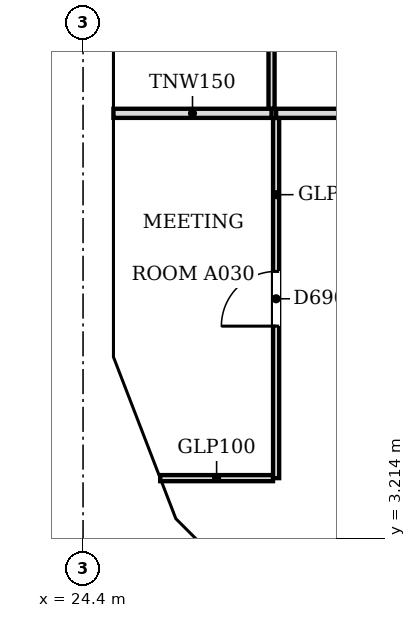
"""IFC4 building model, lengths in metres.
Left out: names, types, materials, properties, quantities, classifications, styles, units other than length and angle.
Written with IfcOpenShell. Run it as: python <this file> out.ifc"""

import sys

from ifc_helpers import new_model, si_unit, direction, frame, frame_2d, origin, place, context, subcontext, project, spatial, polyline, rectangle, outline, extrude, faceted_brep, source, transform, mapped, element, fill, save


model = new_model("IFC4")
c1 = context("Model", 3, precision=1e-05, world=origin(), true_north=direction((0.0, 1.0)))
c2 = subcontext(c1, "Body", "Model", "MODEL_VIEW")
j1 = project(units=[si_unit("LENGTHUNIT", "METRE"), si_unit("PLANEANGLEUNIT", "RADIAN")], contexts=[c1])
p1 = place(None, origin())
s1 = spatial("IfcSite", under=j1, at=p1, CompositionType="ELEMENT")
p2 = place(p1, origin())
s2 = spatial("IfcBuilding", under=s1, at=p2, CompositionType="ELEMENT")
p3 = place(p2, frame((0.0, 0.0, 102.8)))
s3 = spatial("IfcBuildingStorey", under=s2, at=p3, CompositionType="ELEMENT", Elevation=102.8)
m1 = source(origin(), c2, "Body", "Brep", [
    faceted_brep([(0.093, -0.25, 0.057), (3.143, -0.25, 3.8), (0.093, -0.25, 7.543), (0.0, 0.25, 7.544), (0.047, 0.25, 7.6), (3.143, 0.25, 3.8), (0.047, 0.25, 0.0), (0.0, 0.25, 0.056), (0.047, 0.0, 0.0), (0.047, 0.0, 7.6)], [[[0, 1, 2]], [[3, 4, 5, 6, 7]], [[6, 5, 1, 0, 8]], [[5, 4, 9, 2, 1]], [[4, 3, 9]], [[7, 6, 8]], [[7, 8, 0, 2, 9, 3]]]),
])
p4 = place(p3, frame((24.65, 12.293, -3.8), z_axis=(0.0, 0.0, 1.0), x_axis=(0.0, -1.0, 0.0)))
e1 = element("IfcWall", 1, at=p4, inside=s3, PredefinedType="SOLIDWALL", context=c2, shape_type="MappedRepresentation", body=[
    mapped(m1, transform((0.0, 0.0, 0.0), scale=1.0)),
])
m2 = source(origin(), c2, "Body", "SweptSolid", [
    extrude(outline(polyline([(0.247, 0.641), (2.821, 3.8), (0.247, 6.959), (0.247, 0.641)])), frame((0.0, 0.26, 0.0), z_axis=(0.0, -1.0, 0.0), x_axis=(1.0, 0.0, 0.0)), (0.0, 0.0, 1.0), 0.52),
])
p5 = place(p4, origin())
e2 = element("IfcOpeningElement", 2, at=p5, cuts=e1, PredefinedType="OPENING", context=c2, shape_type="MappedRepresentation", body=[
    mapped(m2, transform((0.0, 0.0, 0.0), scale=1.0)),
])
m3 = source(origin(), c2, "Body", "Brep", [
    faceted_brep([(3.003, -0.25, 0.0), (3.05, -0.25, 0.06), (3.05, -0.25, 7.54), (3.003, -0.25, 7.6), (0.0, -0.25, 3.8), (0.0, 0.25, 3.8), (2.957, 0.25, 7.541), (2.957, 0.25, 0.059), (3.003, 0.0, 0.0), (3.003, 0.0, 7.6)], [[[0, 1, 2, 3, 4]], [[5, 6, 7]], [[1, 0, 8]], [[9, 3, 2]], [[6, 5, 4, 3, 9]], [[5, 7, 8, 0, 4]], [[1, 8, 7, 6, 9, 2]]]),
])
p6 = place(p3, frame((24.65, 9.15, -3.8), z_axis=(0.0, 0.0, 1.0), x_axis=(0.0, -1.0, 0.0)))
e3 = element("IfcWall", 3, at=p6, inside=s3, PredefinedType="SOLIDWALL", context=c2, shape_type="MappedRepresentation", body=[
    mapped(m3, transform((0.0, 0.0, 0.0), scale=1.0)),
])
m4 = source(origin(), c2, "Body", "SweptSolid", [
    extrude(outline(polyline([(2.803, 6.944), (0.319, 3.8), (2.803, 0.656), (2.803, 6.944)])), frame((0.0, 0.26, 0.0), z_axis=(0.0, -1.0, 0.0), x_axis=(1.0, 0.0, 0.0)), (0.0, 0.0, 1.0), 0.52),
])
p7 = place(p6, origin())
e4 = element("IfcOpeningElement", 4, at=p7, cuts=e3, PredefinedType="OPENING", context=c2, shape_type="MappedRepresentation", body=[
    mapped(m4, transform((0.0, 0.0, 0.0), scale=1.0)),
])
m5 = source(origin(), c2, "Body", "Brep", [
    faceted_brep([(0.047, -0.25, 0.0), (2.997, -0.25, 3.8), (0.047, -0.25, 7.6), (0.0, -0.25, 7.541), (0.0, -0.25, 0.059), (0.093, 0.25, 7.54), (2.944, 0.25, 3.868), (2.944, 0.25, 3.732), (0.093, 0.25, 0.06), (2.997, 0.0, 3.8), (0.047, 0.0, 0.0), (0.047, 0.0, 7.6)], [[[0, 1, 2, 3, 4]], [[5, 6, 7, 8]], [[8, 7, 9, 1, 0, 10]], [[6, 5, 11, 2, 1, 9]], [[3, 2, 11]], [[10, 0, 4]], [[8, 10, 4, 3, 11, 5]], [[9, 7, 6]]]),
])
p8 = place(p3, frame((24.633, 6.19, -3.8), z_axis=(0.0, 0.0, 1.0), x_axis=(0.359901446078, -0.932990326376, 0.0)))
e5 = element("IfcWall", 5, at=p8, inside=s3, PredefinedType="SOLIDWALL", context=c2, shape_type="MappedRepresentation", body=[
    mapped(m5, transform((0.0, 0.0, 0.0), scale=1.0)),
])
m6 = source(origin(), c2, "Body", "SweptSolid", [
    extrude(outline(polyline([(0.247, 0.665), (2.681, 3.8), (0.247, 6.935), (0.247, 0.665)])), frame((0.0, 0.26, 0.0), z_axis=(0.0, -1.0, 0.0), x_axis=(1.0, 0.0, 0.0)), (0.0, 0.0, 1.0), 0.52),
])
p9 = place(p8, origin())
e6 = element("IfcOpeningElement", 6, at=p9, cuts=e5, PredefinedType="OPENING", context=c2, shape_type="MappedRepresentation", body=[
    mapped(m6, transform((0.0, 0.0, 0.0), scale=1.0)),
])
m7 = source(origin(), c2, "Body", "Brep", [
    faceted_brep([(2.944, -0.25, 0.0), (2.997, -0.25, 0.068), (2.997, -0.25, 7.532), (2.944, -0.25, 7.6), (0.0, -0.25, 3.8), (0.053, 0.25, 3.868), (2.891, 0.25, 7.532), (2.891, 0.25, 0.068), (0.053, 0.25, 3.732), (2.944, 0.0, 0.0), (2.944, 0.0, 7.6), (0.0, 0.0, 3.8)], [[[0, 1, 2, 3, 4]], [[5, 6, 7, 8]], [[1, 0, 9]], [[10, 3, 2]], [[6, 5, 11, 4, 3, 10]], [[8, 7, 9, 0, 4, 11]], [[8, 11, 5]], [[1, 9, 7, 6, 10, 2]]]),
])
p10 = place(p3, frame((25.712, 3.394, -3.8), z_axis=(0.0, 0.0, 1.0), x_axis=(0.707066050402, -0.707147509625, 0.0)))
e7 = element("IfcWall", 7, at=p10, inside=s3, PredefinedType="SOLIDWALL", context=c2, shape_type="MappedRepresentation", body=[
    mapped(m7, transform((0.0, 0.0, 0.0), scale=1.0)),
])
m8 = source(origin(), c2, "Body", "SweptSolid", [
    extrude(outline(polyline([(2.744, 6.934), (0.316, 3.8), (2.744, 0.666), (2.744, 6.934)])), frame((0.0, 0.26, 0.0), z_axis=(0.0, -1.0, 0.0), x_axis=(1.0, 0.0, 0.0)), (0.0, 0.0, 1.0), 0.52),
])
p11 = place(p10, origin())
e8 = element("IfcOpeningElement", 8, at=p11, cuts=e7, PredefinedType="OPENING", context=c2, shape_type="MappedRepresentation", body=[
    mapped(m8, transform((0.0, 0.0, 0.0), scale=1.0)),
])
m9 = source(origin(), c2, "Body", "Brep", [
    faceted_brep([(3.096, -0.25, 0.0), (6.1, -0.25, 3.8), (0.047, -0.25, 3.8), (0.047, -0.25, 3.743), (0.0, 0.25, 3.8), (6.053, 0.25, 3.8), (6.053, 0.25, 3.741), (3.096, 0.25, 0.0), (6.1, -0.0, 3.8), (0.0, 0.0, 3.8)], [[[0, 1, 2, 3]], [[4, 5, 6, 7]], [[7, 6, 8, 1, 0]], [[5, 4, 9, 2, 1, 8]], [[4, 7, 0, 3, 9]], [[3, 2, 9]], [[6, 5, 8]]]),
])
p12 = place(p3, frame((24.65, 12.247, 0.0), z_axis=(0.0, 0.0, 1.0), x_axis=(0.0, -1.0, 0.0)))
e9 = element("IfcWall", 9, at=p12, inside=s3, PredefinedType="SOLIDWALL", context=c2, shape_type="MappedRepresentation", body=[
    mapped(m9, transform((0.0, 0.0, 0.0), scale=1.0)),
])
m10 = source(origin(), c2, "Body", "SweptSolid", [
    extrude(outline(polyline([(3.094, 0.399), (5.584, 3.55), (0.526, 3.55), (3.094, 0.399)])), frame((0.0, 0.26, 0.0), z_axis=(0.0, -1.0, 0.0), x_axis=(1.0, 0.0, 0.0)), (0.0, 0.0, 1.0), 0.52),
])
p13 = place(p12, origin())
e10 = element("IfcOpeningElement", 10, at=p13, cuts=e9, PredefinedType="OPENING", context=c2, shape_type="MappedRepresentation", body=[
    mapped(m10, transform((0.0, 0.0, 0.0), scale=1.0)),
])
m11 = source(origin(), c2, "Body", "Brep", [
    faceted_brep([(2.95, -0.25, 0.0), (3.003, -0.25, 0.068), (3.003, -0.25, 3.8), (0.0, -0.25, 3.8), (0.047, 0.25, 3.8), (2.898, 0.25, 3.8), (2.898, 0.25, 0.068), (0.047, 0.25, 3.74), (2.95, 0.0, 0.0), (0.0, 0.0, 3.8)], [[[0, 1, 2, 3]], [[4, 5, 6, 7]], [[1, 0, 8]], [[5, 4, 9, 3, 2]], [[7, 6, 8, 0, 3, 9]], [[7, 9, 4]], [[1, 8, 6, 5, 2]]]),
])
p14 = place(p3, frame((24.65, 6.146, 0.0), z_axis=(0.0, 0.0, 1.0), x_axis=(0.359953949349, -0.932970071518, 0.0)))
e11 = element("IfcWall", 11, at=p14, inside=s3, PredefinedType="SOLIDWALL", context=c2, shape_type="MappedRepresentation", body=[
    mapped(m11, transform((0.0, 0.0, 0.0), scale=1.0)),
])
m12 = source(origin(), c2, "Body", "SweptSolid", [
    extrude(outline(polyline([(2.75, 3.55), (0.511, 3.55), (2.75, 0.665), (2.75, 3.55)])), frame((0.0, 0.26, 0.0), z_axis=(0.0, -1.0, 0.0), x_axis=(1.0, 0.0, 0.0)), (0.0, 0.0, 1.0), 0.52),
])
p15 = place(p14, origin())
e12 = element("IfcOpeningElement", 12, at=p15, cuts=e11, PredefinedType="OPENING", context=c2, shape_type="MappedRepresentation", body=[
    mapped(m12, transform((0.0, 0.0, 0.0), scale=1.0)),
])
m13 = source(origin(), c2, "Body", "Brep", [
    faceted_brep([(0.053, -0.25, 0.0), (2.997, -0.25, 3.8), (0.0, -0.25, 3.8), (0.0, -0.25, 0.068), (0.106, 0.25, 3.8), (2.944, 0.25, 3.8), (2.944, 0.25, 3.732), (0.106, 0.25, 0.068), (2.997, 0.0, 3.8), (0.053, 0.0, 0.0)], [[[0, 1, 2, 3]], [[4, 5, 6, 7]], [[7, 6, 8, 1, 0, 9]], [[5, 4, 2, 1, 8]], [[9, 0, 3]], [[7, 9, 3, 2, 4]], [[6, 5, 8]]]),
])
p16 = place(p3, frame((25.675, 3.431, 0.0), z_axis=(0.0, 0.0, 1.0), x_axis=(0.707106781187, -0.707106781187, 0.0)))
e13 = element("IfcWall", 13, at=p16, inside=s3, PredefinedType="SOLIDWALL", context=c2, shape_type="MappedRepresentation", body=[
    mapped(m13, transform((0.0, 0.0, 0.0), scale=1.0)),
])
m14 = source(origin(), c2, "Body", "SweptSolid", [
    extrude(outline(polyline([(0.253, 0.666), (2.487, 3.55), (0.253, 3.55), (0.253, 0.666)])), frame((0.0, 0.26, 0.0), z_axis=(0.0, -1.0, 0.0), x_axis=(1.0, 0.0, 0.0)), (0.0, 0.0, 1.0), 0.52),
])
p17 = place(p16, origin())
e14 = element("IfcOpeningElement", 14, at=p17, cuts=e13, PredefinedType="OPENING", context=c2, shape_type="MappedRepresentation", body=[
    mapped(m14, transform((0.0, 0.0, 0.0), scale=1.0)),
])
p18 = place(p3, frame((25.669, 4.2, 0.0), z_axis=(0.0, 0.0, 1.0), x_axis=(1.0, 0.0, 0.0)))
e15 = element("IfcWall", 15, at=p18, inside=s3, PredefinedType="PARTITIONING", context=c2, shape_type="SweptSolid", body=[
    extrude(rectangle(XDim=1.855, YDim=0.1, at=frame_2d((0.928, 0.0))), origin(), (0.0, 0.0, 1.0), 2.715),
])
p19 = place(p3, frame((27.575, 4.2, 0.0), z_axis=(0.0, 0.0, 1.0), x_axis=(0.0, 1.0, 0.0)))
e16 = element("IfcWall", 16, at=p19, inside=s3, PredefinedType="PARTITIONING", context=c2, shape_type="SweptSolid", body=[
    extrude(rectangle(XDim=5.924, YDim=0.1, at=frame_2d((2.962, 0.0))), origin(), (0.0, 0.0, 1.0), 2.715),
])
m15 = source(origin(), c2, "Body", "SweptSolid", [
    extrude(rectangle(XDim=0.9, YDim=2.1, at=frame_2d((0.45, 1.05))), frame((0.0, 0.06, 0.0), z_axis=(0.0, -1.0, 0.0), x_axis=(1.0, 0.0, 0.0)), (0.0, 0.0, 1.0), 0.12),
])
p20 = place(p19, frame((2.5, 0.0, 0.0)))
e17 = element("IfcOpeningElement", 17, at=p20, cuts=e16, PredefinedType="OPENING", context=c2, shape_type="MappedRepresentation", body=[
    mapped(m15, transform((0.0, 0.0, 0.0), scale=1.0)),
])
p21 = place(p3, frame((24.9, 10.2, 0.0), z_axis=(0.0, 0.0, 1.0), x_axis=(1.0, 0.0, 0.0)))
e18 = element("IfcWall", 18, at=p21, inside=s3, PredefinedType="PARTITIONING", context=c2, shape_type="SweptSolid", body=[
    extrude(rectangle(XDim=2.6, YDim=0.15, at=frame_2d((1.3, 0.0))), origin(), (0.0, 0.0, 1.0), 2.715),
])
p22 = place(p3, frame((27.575, 10.2, 0.0), z_axis=(0.0, 0.0, 1.0), x_axis=(1.0, 0.0, 0.0)))
e19 = element("IfcWall", 19, at=p22, inside=s3, PredefinedType="PARTITIONING", context=c2, shape_type="SweptSolid", body=[
    extrude(rectangle(XDim=17.349, YDim=0.15, at=frame_2d((8.675, 0.0))), origin(), (0.0, 0.0, 1.0), 2.715),
])
p23 = place(p3, frame((27.5, 10.276, 0.0), z_axis=(0.0, 0.0, 1.0), x_axis=(0.0, 1.0, 0.0)))
e20 = element("IfcWall", 20, at=p23, inside=s3, PredefinedType="PARTITIONING", context=c2, shape_type="SweptSolid", body=[
    extrude(rectangle(XDim=8.448, YDim=0.1, at=frame_2d((4.224, 0.0))), origin(), (0.0, 0.0, 1.0), 2.715),
])
p24 = place(p23, frame((3.8, 0.0, 0.0)))
e21 = element("IfcOpeningElement", 21, at=p24, cuts=e20, PredefinedType="OPENING", context=c2, shape_type="MappedRepresentation", body=[
    mapped(m15, transform((0.0, 0.0, 0.0), scale=1.0)),
])
m16 = source(origin(), c2, "Body", "SweptSolid", [
    extrude(rectangle(XDim=0.9, YDim=2.1, at=frame_2d((0.45, 1.05))), frame((0.0, 0.025, 0.0), z_axis=(0.0, -1.0, 0.0), x_axis=(1.0, 0.0, 0.0)), (0.0, 0.0, 1.0), 0.05),
])
p25 = place(p20, origin())
e22 = element("IfcDoor", 22, at=p25, inside=s3, OperationType="SINGLE_SWING_LEFT", PredefinedType="DOOR", context=c2, shape_type="MappedRepresentation", body=[
    mapped(m16, transform((0.0, 0.0, 0.0), scale=1.0)),
])
fill(e17, e22)
save(model, sys.argv[1])
